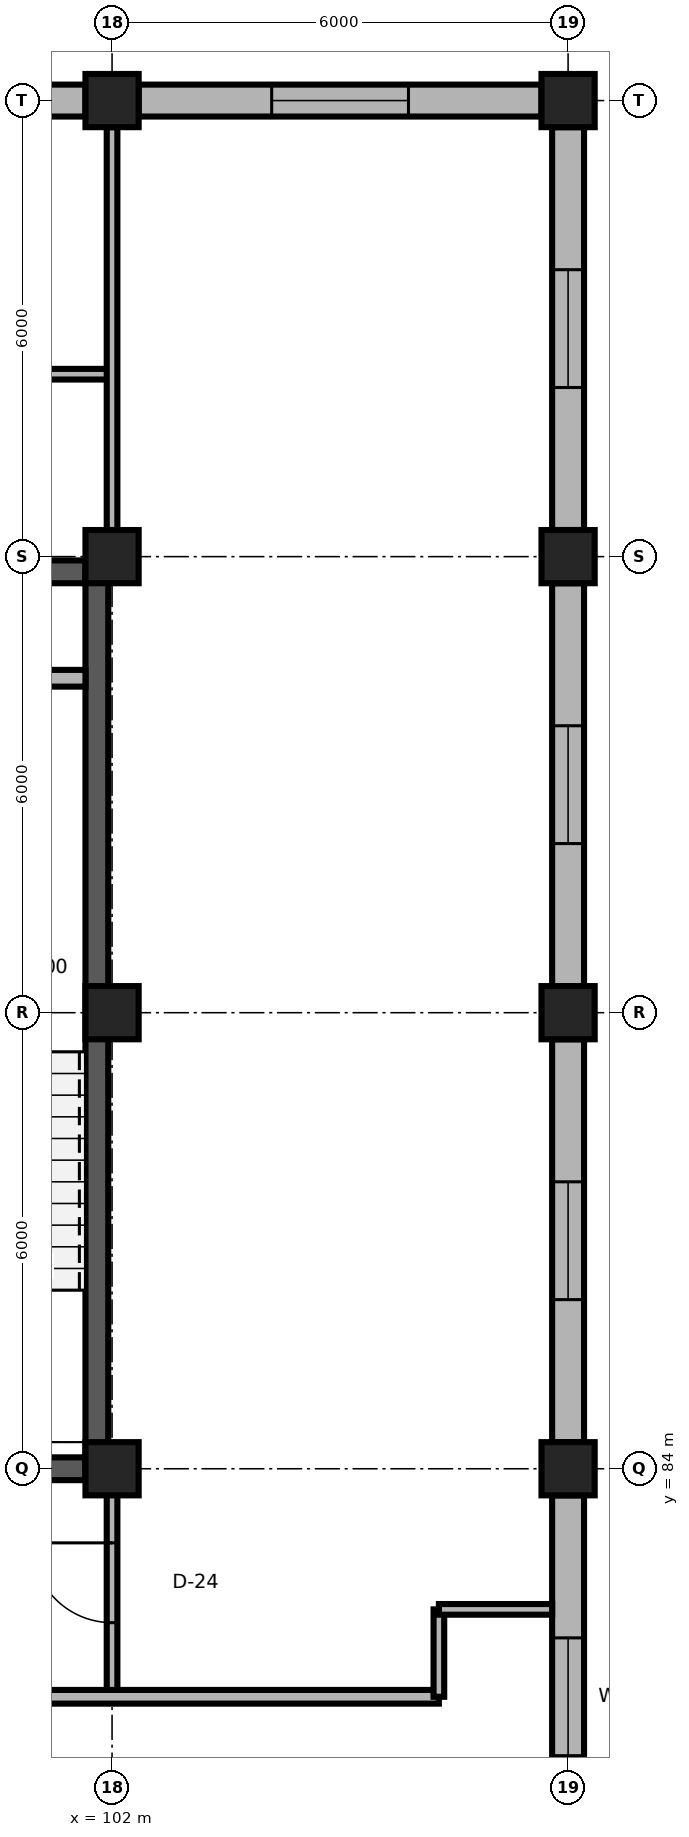
"""IFC4 building model, lengths in metres.
Left out: names, types, materials, properties, quantities, classifications, styles, units other than length and angle.
Written with IfcOpenShell. Run it as: python <this file> out.ifc"""

import sys

from ifc_helpers import new_model, si_unit, direction, frame, frame_2d, origin, origin_2d, place, context, subcontext, project, spatial, rectangle, extrude, element, fill, save


model = new_model("IFC4")
c1 = context("Model", 3, precision=1e-05, world=origin(), true_north=direction((0.0, 1.0)))
c2 = subcontext(c1, "Body", "Model", "MODEL_VIEW")
j1 = project(units=[si_unit("LENGTHUNIT", "METRE"), si_unit("PLANEANGLEUNIT", "RADIAN")], contexts=[c1])
p1 = place(None, origin())
s1 = spatial("IfcSite", under=j1, at=p1, CompositionType="ELEMENT")
p2 = place(p1, origin())
s2 = spatial("IfcBuilding", under=s1, at=p2, CompositionType="ELEMENT")
p3 = place(p2, frame((0.0, 0.0, 63.9)))
s3 = spatial("IfcBuildingStorey", under=s2, at=p3, CompositionType="ELEMENT", Elevation=63.9)
p4 = place(p3, frame((102.0, 84.0, 0.0), z_axis=(0.0, 0.0, 1.0), x_axis=(1.0, 0.0, 0.0)))
e1 = element("IfcColumn", 1, at=p4, inside=s3, PredefinedType="COLUMN", context=c2, shape_type="SweptSolid", body=[
    extrude(rectangle(XDim=0.7, YDim=0.7, at=origin_2d()), origin(), (0.0, 0.0, 1.0), 3.9),
])
p5 = place(p3, frame((108.0, 84.0, 0.0), z_axis=(0.0, 0.0, 1.0), x_axis=(1.0, 0.0, 0.0)))
e2 = element("IfcColumn", 2, at=p5, inside=s3, PredefinedType="COLUMN", context=c2, shape_type="SweptSolid", body=[
    extrude(rectangle(XDim=0.7, YDim=0.7, at=origin_2d()), origin(), (0.0, 0.0, 1.0), 3.68),
])
p6 = place(p3, frame((102.0, 90.0, 0.0), z_axis=(0.0, 0.0, 1.0), x_axis=(1.0, 0.0, 0.0)))
e3 = element("IfcColumn", 3, at=p6, inside=s3, PredefinedType="COLUMN", context=c2, shape_type="SweptSolid", body=[
    extrude(rectangle(XDim=0.7, YDim=0.7, at=origin_2d()), origin(), (0.0, 0.0, 1.0), 3.9),
])
p7 = place(p3, frame((108.0, 90.0, 0.0), z_axis=(0.0, 0.0, 1.0), x_axis=(1.0, 0.0, 0.0)))
e4 = element("IfcColumn", 4, at=p7, inside=s3, PredefinedType="COLUMN", context=c2, shape_type="SweptSolid", body=[
    extrude(rectangle(XDim=0.7, YDim=0.7, at=origin_2d()), origin(), (0.0, 0.0, 1.0), 3.68),
])
p8 = place(p3, frame((102.0, 96.0, 0.0), z_axis=(0.0, 0.0, 1.0), x_axis=(1.0, 0.0, 0.0)))
e5 = element("IfcColumn", 5, at=p8, inside=s3, PredefinedType="COLUMN", context=c2, shape_type="SweptSolid", body=[
    extrude(rectangle(XDim=0.7, YDim=0.7, at=origin_2d()), origin(), (0.0, 0.0, 1.0), 3.9),
])
p9 = place(p3, frame((108.0, 96.0, 0.0), z_axis=(0.0, 0.0, 1.0), x_axis=(1.0, 0.0, 0.0)))
e6 = element("IfcColumn", 6, at=p9, inside=s3, PredefinedType="COLUMN", context=c2, shape_type="SweptSolid", body=[
    extrude(rectangle(XDim=0.7, YDim=0.7, at=origin_2d()), origin(), (0.0, 0.0, 1.0), 3.68),
])
p10 = place(p3, frame((102.0, 102.0, 0.0), z_axis=(0.0, 0.0, 1.0), x_axis=(1.0, 0.0, 0.0)))
e7 = element("IfcColumn", 7, at=p10, inside=s3, PredefinedType="COLUMN", context=c2, shape_type="SweptSolid", body=[
    extrude(rectangle(XDim=0.7, YDim=0.7, at=origin_2d()), origin(), (0.0, 0.0, 1.0), 3.9),
])
p11 = place(p3, frame((108.0, 102.0, 0.0), z_axis=(0.0, 0.0, 1.0), x_axis=(1.0, 0.0, 0.0)))
e8 = element("IfcColumn", 8, at=p11, inside=s3, PredefinedType="COLUMN", context=c2, shape_type="SweptSolid", body=[
    extrude(rectangle(XDim=0.7, YDim=0.7, at=origin_2d()), origin(), (0.0, 0.0, 1.0), 3.68),
])
p12 = place(p3, frame((96.35, 102.0, 0.0), z_axis=(0.0, 0.0, 1.0), x_axis=(1.0, 0.0, 0.0)))
e9 = element("IfcWall", 9, at=p12, inside=s3, PredefinedType="SOLIDWALL", context=c2, shape_type="SweptSolid", body=[
    extrude(rectangle(XDim=5.3, YDim=0.42, at=frame_2d((2.65, 0.0))), origin(), (0.0, 0.0, 1.0), 3.24),
])
p13 = place(p12, frame((1.75, 0.0, 0.85)))
e10 = element("IfcOpeningElement", 10, at=p13, cuts=e9, PredefinedType="OPENING", context=c2, shape_type="SweptSolid", body=[
    extrude(rectangle(XDim=1.8, YDim=1.95, at=frame_2d((0.9, 0.975))), frame((0.0, 0.225, 0.0), z_axis=(0.0, -1.0, 0.0), x_axis=(1.0, 0.0, 0.0)), (0.0, 0.0, 1.0), 0.45),
])
p14 = place(p3, frame((102.35, 102.0, 0.0), z_axis=(0.0, 0.0, 1.0), x_axis=(1.0, 0.0, 0.0)))
e11 = element("IfcWall", 11, at=p14, inside=s3, PredefinedType="SOLIDWALL", context=c2, shape_type="SweptSolid", body=[
    extrude(rectangle(XDim=5.3, YDim=0.42, at=frame_2d((2.65, 0.0))), origin(), (0.0, 0.0, 1.0), 3.24),
])
p15 = place(p14, frame((1.75, 0.0, 0.85)))
e12 = element("IfcOpeningElement", 12, at=p15, cuts=e11, PredefinedType="OPENING", context=c2, shape_type="SweptSolid", body=[
    extrude(rectangle(XDim=1.8, YDim=1.95, at=frame_2d((0.9, 0.975))), frame((0.0, 0.225, 0.0), z_axis=(0.0, -1.0, 0.0), x_axis=(1.0, 0.0, 0.0)), (0.0, 0.0, 1.0), 0.45),
])
p16 = place(p3, frame((108.0, 78.35, 0.0), z_axis=(0.0, 0.0, 1.0), x_axis=(0.0, 1.0, 0.0)))
e13 = element("IfcWall", 13, at=p16, inside=s3, PredefinedType="SOLIDWALL", context=c2, shape_type="SweptSolid", body=[
    extrude(rectangle(XDim=5.3, YDim=0.42, at=frame_2d((2.65, 0.0))), origin(), (0.0, 0.0, 1.0), 3.24),
])
p17 = place(p16, frame((1.875, 0.0, 0.85)))
e14 = element("IfcOpeningElement", 14, at=p17, cuts=e13, PredefinedType="OPENING", context=c2, shape_type="SweptSolid", body=[
    extrude(rectangle(XDim=1.55, YDim=1.9, at=frame_2d((0.775, 0.95))), frame((0.0, 0.225, 0.0), z_axis=(0.0, -1.0, 0.0), x_axis=(1.0, 0.0, 0.0)), (0.0, 0.0, 1.0), 0.45),
])
p18 = place(p3, frame((108.0, 84.35, 0.0), z_axis=(0.0, 0.0, 1.0), x_axis=(0.0, 1.0, 0.0)))
e15 = element("IfcWall", 15, at=p18, inside=s3, PredefinedType="SOLIDWALL", context=c2, shape_type="SweptSolid", body=[
    extrude(rectangle(XDim=5.3, YDim=0.42, at=frame_2d((2.65, 0.0))), origin(), (0.0, 0.0, 1.0), 3.24),
])
p19 = place(p18, frame((1.875, 0.0, 0.85)))
e16 = element("IfcOpeningElement", 16, at=p19, cuts=e15, PredefinedType="OPENING", context=c2, shape_type="SweptSolid", body=[
    extrude(rectangle(XDim=1.55, YDim=1.9, at=frame_2d((0.775, 0.95))), frame((0.0, 0.225, 0.0), z_axis=(0.0, -1.0, 0.0), x_axis=(1.0, 0.0, 0.0)), (0.0, 0.0, 1.0), 0.45),
])
p20 = place(p3, frame((108.0, 90.35, 0.0), z_axis=(0.0, 0.0, 1.0), x_axis=(0.0, 1.0, 0.0)))
e17 = element("IfcWall", 17, at=p20, inside=s3, PredefinedType="SOLIDWALL", context=c2, shape_type="SweptSolid", body=[
    extrude(rectangle(XDim=5.3, YDim=0.42, at=frame_2d((2.65, 0.0))), origin(), (0.0, 0.0, 1.0), 3.24),
])
p21 = place(p20, frame((1.875, 0.0, 0.85)))
e18 = element("IfcOpeningElement", 18, at=p21, cuts=e17, PredefinedType="OPENING", context=c2, shape_type="SweptSolid", body=[
    extrude(rectangle(XDim=1.55, YDim=1.9, at=frame_2d((0.775, 0.95))), frame((0.0, 0.225, 0.0), z_axis=(0.0, -1.0, 0.0), x_axis=(1.0, 0.0, 0.0)), (0.0, 0.0, 1.0), 0.45),
])
p22 = place(p3, frame((108.0, 96.35, 0.0), z_axis=(0.0, 0.0, 1.0), x_axis=(0.0, 1.0, 0.0)))
e19 = element("IfcWall", 19, at=p22, inside=s3, PredefinedType="SOLIDWALL", context=c2, shape_type="SweptSolid", body=[
    extrude(rectangle(XDim=5.3, YDim=0.42, at=frame_2d((2.65, 0.0))), origin(), (0.0, 0.0, 1.0), 3.24),
])
p23 = place(p22, frame((1.875, 0.0, 0.85)))
e20 = element("IfcOpeningElement", 20, at=p23, cuts=e19, PredefinedType="OPENING", context=c2, shape_type="SweptSolid", body=[
    extrude(rectangle(XDim=1.55, YDim=1.9, at=frame_2d((0.775, 0.95))), frame((0.0, 0.225, 0.0), z_axis=(0.0, -1.0, 0.0), x_axis=(1.0, 0.0, 0.0)), (0.0, 0.0, 1.0), 0.45),
])
p24 = place(p3, frame((96.35, 84.0, 0.0), z_axis=(0.0, 0.0, 1.0), x_axis=(1.0, 0.0, 0.0)))
e21 = element("IfcWall", 21, at=p24, inside=s3, PredefinedType="SHEAR", context=c2, shape_type="SweptSolid", body=[
    extrude(rectangle(XDim=5.3, YDim=0.3, at=frame_2d((2.65, 0.0))), origin(), (0.0, 0.0, 1.0), 3.66),
])
p25 = place(p24, frame((1.975, 0.0, 0.0)))
e22 = element("IfcOpeningElement", 22, at=p25, cuts=e21, PredefinedType="OPENING", context=c2, shape_type="SweptSolid", body=[
    extrude(rectangle(XDim=1.35, YDim=2.2, at=frame_2d((0.675, 1.1))), frame((0.0, 0.165, 0.0), z_axis=(0.0, -1.0, 0.0), x_axis=(1.0, 0.0, 0.0)), (0.0, 0.0, 1.0), 0.33),
])
p26 = place(p3, frame((96.35, 95.8, 0.0), z_axis=(0.0, 0.0, 1.0), x_axis=(1.0, 0.0, 0.0)))
e23 = element("IfcWall", 23, at=p26, inside=s3, PredefinedType="SHEAR", context=c2, shape_type="SweptSolid", body=[
    extrude(rectangle(XDim=5.3, YDim=0.3, at=frame_2d((2.65, 0.0))), origin(), (0.0, 0.0, 1.0), 3.66),
])
p27 = place(p3, frame((101.8, 84.0, 0.0), z_axis=(0.0, 0.0, 1.0), x_axis=(0.0, 1.0, 0.0)))
e24 = element("IfcWall", 24, at=p27, inside=s3, PredefinedType="SHEAR", context=c2, shape_type="SweptSolid", body=[
    extrude(rectangle(XDim=11.8, YDim=0.3, at=frame_2d((5.9, 0.0))), origin(), (0.0, 0.0, 1.0), 3.66),
])
p28 = place(p3, frame((100.55, 94.4, 0.0), z_axis=(0.0, 0.0, 1.0), x_axis=(1.0, 0.0, 0.0)))
e25 = element("IfcWall", 25, at=p28, inside=s3, PredefinedType="PARTITIONING", context=c2, shape_type="SweptSolid", body=[
    extrude(rectangle(XDim=1.1, YDim=0.22, at=frame_2d((0.55, 0.0))), origin(), (0.0, 0.0, 1.0), 3.66),
])
p29 = place(p3, frame((102.0, 81.05, 0.0), z_axis=(0.0, 0.0, 1.0), x_axis=(0.0, 1.0, 0.0)))
e26 = element("IfcWall", 26, at=p29, inside=s3, PredefinedType="PARTITIONING", context=c2, shape_type="SweptSolid", body=[
    extrude(rectangle(XDim=2.9, YDim=0.14, at=frame_2d((1.45, 0.0))), origin(), (0.0, 0.0, 1.0), 3.369),
])
p30 = place(p29, frame((0.925, 0.0, 0.0)))
e27 = element("IfcOpeningElement", 27, at=p30, cuts=e26, PredefinedType="OPENING", context=c2, shape_type="SweptSolid", body=[
    extrude(rectangle(XDim=1.05, YDim=2.25, at=frame_2d((0.525, 1.125))), frame((0.0, 0.085, 0.0), z_axis=(0.0, -1.0, 0.0), x_axis=(1.0, 0.0, 0.0)), (0.0, 0.0, 1.0), 0.17),
])
p31 = place(p3, frame((96.0, 98.4, 0.0), z_axis=(0.0, 0.0, 1.0), x_axis=(1.0, 0.0, 0.0)))
e28 = element("IfcWall", 28, at=p31, inside=s3, PredefinedType="PARTITIONING", context=c2, shape_type="SweptSolid", body=[
    extrude(rectangle(XDim=6.0, YDim=0.14, at=frame_2d((3.0, 0.0))), origin(), (0.0, 0.0, 1.0), 3.66),
])
p32 = place(p31, frame((2.54, 0.0, 0.0)))
e29 = element("IfcOpeningElement", 29, at=p32, cuts=e28, PredefinedType="OPENING", context=c2, shape_type="SweptSolid", body=[
    extrude(rectangle(XDim=0.92, YDim=2.15, at=frame_2d((0.46, 1.075))), frame((0.0, 0.085, 0.0), z_axis=(0.0, -1.0, 0.0), x_axis=(1.0, 0.0, 0.0)), (0.0, 0.0, 1.0), 0.17),
])
p33 = place(p3, frame((96.0, 81.0, 0.0), z_axis=(0.0, 0.0, 1.0), x_axis=(1.0, 0.0, 0.0)))
e30 = element("IfcWall", 30, at=p33, inside=s3, PredefinedType="PARTITIONING", context=c2, shape_type="SweptSolid", body=[
    extrude(rectangle(XDim=10.3, YDim=0.18, at=frame_2d((5.15, 0.0))), origin(), (0.0, 0.0, 1.0), 3.66),
])
p34 = place(p3, frame((106.3, 81.0, 0.0), z_axis=(0.0, 0.0, 1.0), x_axis=(0.0, 1.0, 0.0)))
e31 = element("IfcWall", 31, at=p34, inside=s3, PredefinedType="PARTITIONING", context=c2, shape_type="SweptSolid", body=[
    extrude(rectangle(XDim=1.15, YDim=0.14, at=frame_2d((0.575, 0.0))), origin(), (0.0, 0.0, 1.0), 3.66),
])
p35 = place(p3, frame((106.3, 82.15, 0.0), z_axis=(0.0, 0.0, 1.0), x_axis=(1.0, 0.0, 0.0)))
e32 = element("IfcWall", 32, at=p35, inside=s3, PredefinedType="PARTITIONING", context=c2, shape_type="SweptSolid", body=[
    extrude(rectangle(XDim=1.49, YDim=0.14, at=frame_2d((0.745, 0.0))), origin(), (0.0, 0.0, 1.0), 3.66),
])
p36 = place(p3, frame((102.0, 96.35, 0.0), z_axis=(0.0, 0.0, 1.0), x_axis=(0.0, 1.0, 0.0)))
e33 = element("IfcWall", 33, at=p36, inside=s3, PredefinedType="PARTITIONING", context=c2, shape_type="SweptSolid", body=[
    extrude(rectangle(XDim=5.3, YDim=0.14, at=frame_2d((2.65, 0.0))), origin(), (0.0, 0.0, 1.0), 3.369),
])
p37 = place(p15, origin())
e34 = element("IfcWindow", 34, at=p37, inside=s3, PartitioningType="SINGLE_PANEL", PredefinedType="WINDOW", context=c2, shape_type="SweptSolid", body=[
    extrude(rectangle(XDim=1.8, YDim=1.95, at=frame_2d((0.9, 0.975))), frame((0.0, 0.03, 0.0), z_axis=(0.0, -1.0, 0.0), x_axis=(1.0, 0.0, 0.0)), (0.0, 0.0, 1.0), 0.06),
])
fill(e12, e34)
p38 = place(p17, origin())
e35 = element("IfcWindow", 35, at=p38, inside=s3, PartitioningType="SINGLE_PANEL", PredefinedType="WINDOW", context=c2, shape_type="SweptSolid", body=[
    extrude(rectangle(XDim=1.55, YDim=1.9, at=frame_2d((0.775, 0.95))), frame((0.0, 0.03, 0.0), z_axis=(0.0, -1.0, 0.0), x_axis=(1.0, 0.0, 0.0)), (0.0, 0.0, 1.0), 0.06),
])
fill(e14, e35)
p39 = place(p19, origin())
e36 = element("IfcWindow", 36, at=p39, inside=s3, PartitioningType="SINGLE_PANEL", PredefinedType="WINDOW", context=c2, shape_type="SweptSolid", body=[
    extrude(rectangle(XDim=1.55, YDim=1.9, at=frame_2d((0.775, 0.95))), frame((0.0, 0.03, 0.0), z_axis=(0.0, -1.0, 0.0), x_axis=(1.0, 0.0, 0.0)), (0.0, 0.0, 1.0), 0.06),
])
fill(e16, e36)
p40 = place(p21, origin())
e37 = element("IfcWindow", 37, at=p40, inside=s3, PartitioningType="SINGLE_PANEL", PredefinedType="WINDOW", context=c2, shape_type="SweptSolid", body=[
    extrude(rectangle(XDim=1.55, YDim=1.9, at=frame_2d((0.775, 0.95))), frame((0.0, 0.03, 0.0), z_axis=(0.0, -1.0, 0.0), x_axis=(1.0, 0.0, 0.0)), (0.0, 0.0, 1.0), 0.06),
])
fill(e18, e37)
p41 = place(p23, origin())
e38 = element("IfcWindow", 38, at=p41, inside=s3, PartitioningType="SINGLE_PANEL", PredefinedType="WINDOW", context=c2, shape_type="SweptSolid", body=[
    extrude(rectangle(XDim=1.55, YDim=1.9, at=frame_2d((0.775, 0.95))), frame((0.0, 0.03, 0.0), z_axis=(0.0, -1.0, 0.0), x_axis=(1.0, 0.0, 0.0)), (0.0, 0.0, 1.0), 0.06),
])
fill(e20, e38)
p42 = place(p30, origin())
e39 = element("IfcDoor", 39, at=p42, inside=s3, OperationType="SINGLE_SWING_RIGHT", PredefinedType="DOOR", context=c2, shape_type="SweptSolid", body=[
    extrude(rectangle(XDim=1.05, YDim=2.25, at=frame_2d((0.525, 1.125))), frame((0.0, 0.025, 0.0), z_axis=(0.0, -1.0, 0.0), x_axis=(1.0, 0.0, 0.0)), (0.0, 0.0, 1.0), 0.05),
])
fill(e27, e39)
save(model, sys.argv[1])
